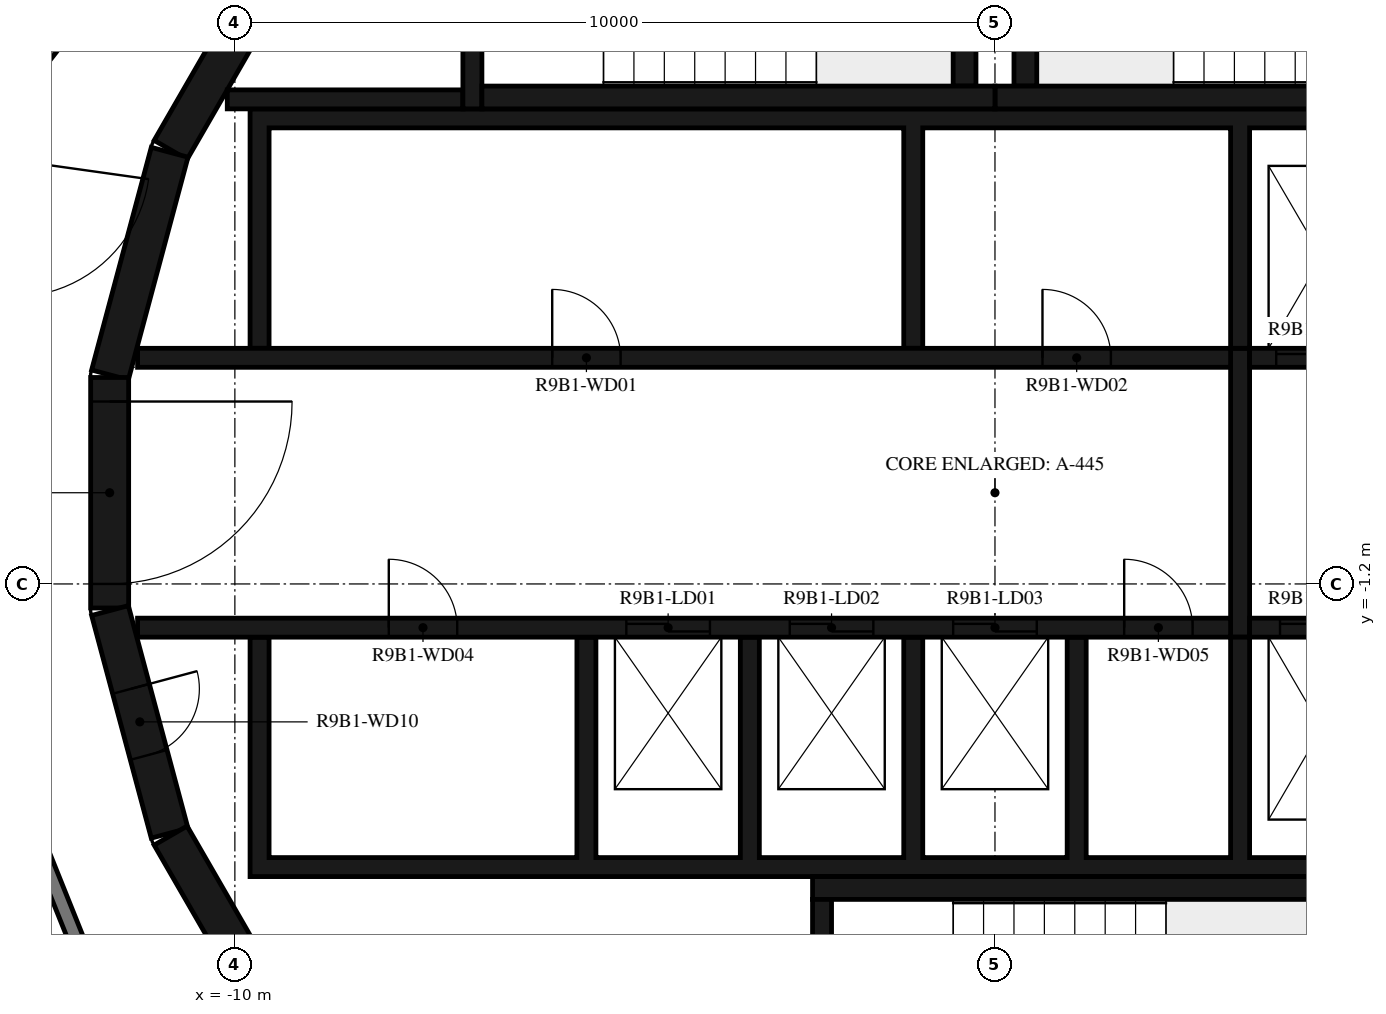
"""IFC4 building model, lengths in metres.
Left out: names, types, materials, properties, quantities, classifications, styles, units other than length and angle.
Written with IfcOpenShell. Run it as: python <this file> out.ifc"""

import sys

from ifc_helpers import new_model, si_unit, direction, frame, frame_2d, origin, place, context, subcontext, project, spatial, polyline, rectangle, outline, extrude, element, fill, save


model = new_model("IFC4")
c1 = context("Model", 3, precision=1e-05, world=origin(), true_north=direction((0.0, 1.0)))
c2 = subcontext(c1, "Body", "Model", "MODEL_VIEW")
j1 = project(units=[si_unit("LENGTHUNIT", "METRE"), si_unit("PLANEANGLEUNIT", "RADIAN")], contexts=[c1])
p1 = place(None, origin())
s1 = spatial("IfcSite", under=j1, at=p1, CompositionType="ELEMENT")
p2 = place(p1, origin())
s2 = spatial("IfcBuilding", under=s1, at=p2, CompositionType="ELEMENT")
p3 = place(p2, frame((0.0, 0.0, 343.5)))
s3 = spatial("IfcBuildingStorey", under=s2, at=p3, CompositionType="ELEMENT", Elevation=343.5)
for number, where, z_axis, x_axis in (
    (1, (-9.329, 7.137, 0.0), (0.0, 0.0, 1.0), (-0.5, -0.866, 0.0)),
    (2, (-10.858, 4.479, 0.0), (0.0, 0.0, 1.0), (-0.259, -0.966, 0.0)),
):
    element("IfcWall", number, at=place(p3, frame(where, z_axis=z_axis, x_axis=x_axis)), inside=s3, PredefinedType="SHEAR", context=c2, shape_type="SweptSolid", body=[
        extrude(rectangle(XDim=3.033, YDim=0.5, at=frame_2d((1.516, 0.0))), origin(), (0.0, 0.0, 1.0), 3.12),
    ])
p4 = place(p3, frame((-11.647, 1.516, 0.0), z_axis=(0.0, 0.0, 1.0), x_axis=(0.0, -1.0, 0.0)))
e3 = element("IfcWall", 3, at=p4, inside=s3, PredefinedType="SHEAR", context=c2, shape_type="SweptSolid", body=[
    extrude(rectangle(XDim=3.033, YDim=0.5, at=frame_2d((1.516, 0.0))), origin(), (0.0, 0.0, 1.0), 3.12),
])
p5 = place(p4, frame((0.316, 0.0, 0.0)))
e4 = element("IfcOpeningElement", 4, at=p5, cuts=e3, PredefinedType="OPENING", context=c2, shape_type="SweptSolid", body=[
    extrude(rectangle(XDim=2.4, YDim=2.1, at=frame_2d((1.2, 1.05))), frame((0.0, 0.26, 0.0), z_axis=(0.0, -1.0, 0.0), x_axis=(1.0, 0.0, 0.0)), (0.0, 0.0, 1.0), 0.52),
])
p6 = place(p3, frame((-11.643, -1.55, 0.0), z_axis=(0.0, 0.0, 1.0), x_axis=(0.258734743916, -0.965948410781, 0.0)))
e5 = element("IfcWall", 5, at=p6, inside=s3, PredefinedType="SHEAR", context=c2, shape_type="SweptSolid", body=[
    extrude(rectangle(XDim=3.033, YDim=0.5, at=frame_2d((1.516, 0.0))), origin(), (0.0, 0.0, 1.0), 3.12),
])
p7 = place(p6, frame((1.066, 0.0, 0.0)))
e6 = element("IfcOpeningElement", 6, at=p7, cuts=e5, PredefinedType="OPENING", context=c2, shape_type="SweptSolid", body=[
    extrude(rectangle(XDim=0.9, YDim=2.1, at=frame_2d((0.45, 1.05))), frame((0.0, 0.26, 0.0), z_axis=(0.0, -1.0, 0.0), x_axis=(1.0, 0.0, 0.0)), (0.0, 0.0, 1.0), 0.52),
])
p8 = place(p3, frame((-10.845, -4.51, 0.0), z_axis=(0.0, 0.0, 1.0), x_axis=(0.500087131594, -0.865975092491, 0.0)))
e7 = element("IfcWall", 7, at=p8, inside=s3, PredefinedType="SHEAR", context=c2, shape_type="SweptSolid", body=[
    extrude(rectangle(XDim=3.033, YDim=0.5, at=frame_2d((1.516, 0.0))), origin(), (0.0, 0.0, 1.0), 3.12),
])
p9 = place(p3, frame((0.0, 5.2, 0.0), z_axis=(0.0, 0.0, 1.0), x_axis=(1.0, 0.0, 0.0)))
e8 = element("IfcWall", 8, at=p9, inside=s3, PredefinedType="SHEAR", context=c2, shape_type="SweptSolid", body=[
    extrude(rectangle(XDim=6.75, YDim=0.3, at=frame_2d((3.375, 0.0))), origin(), (0.0, 0.0, 1.0), 3.12),
])
p10 = place(p3, frame((0.4, 5.35, 0.0), z_axis=(0.0, 0.0, 1.0), x_axis=(0.0, 1.0, 0.0)))
e9 = element("IfcWall", 9, at=p10, inside=s3, PredefinedType="SHEAR", context=c2, shape_type="SweptSolid", body=[
    extrude(rectangle(XDim=3.32, YDim=0.3, at=frame_2d((1.66, 0.0))), origin(), (0.0, 0.0, 1.0), 3.12),
])
p11 = place(p3, frame((-6.75, 5.2, 0.0), z_axis=(0.0, 0.0, 1.0), x_axis=(1.0, 0.0, 0.0)))
e10 = element("IfcWall", 10, at=p11, inside=s3, PredefinedType="SHEAR", context=c2, shape_type="SweptSolid", body=[
    extrude(rectangle(XDim=6.75, YDim=0.3, at=frame_2d((3.375, 0.0))), origin(), (0.0, 0.0, 1.0), 3.12),
])
p12 = place(p3, frame((-0.4, 5.35, 0.0), z_axis=(0.0, 0.0, 1.0), x_axis=(0.0, 1.0, 0.0)))
e11 = element("IfcWall", 11, at=p12, inside=s3, PredefinedType="SHEAR", context=c2, shape_type="SweptSolid", body=[
    extrude(rectangle(XDim=3.32, YDim=0.3, at=frame_2d((1.66, 0.0))), origin(), (0.0, 0.0, 1.0), 3.12),
])
p13 = place(p3, frame((-6.875, 8.97, 0.0), z_axis=(0.0, 0.0, 1.0), x_axis=(0.0, -1.0, 0.0)))
e12 = element("IfcWall", 12, at=p13, inside=s3, PredefinedType="SHEAR", context=c2, shape_type="SweptSolid", body=[
    extrude(rectangle(XDim=3.92, YDim=0.25, at=frame_2d((1.96, 0.0))), origin(), (0.0, 0.0, 1.0), 3.12),
])
p14 = place(p13, frame((1.61, 0.0, 0.0)))
e13 = element("IfcOpeningElement", 13, at=p14, cuts=e12, PredefinedType="OPENING", context=c2, shape_type="SweptSolid", body=[
    extrude(rectangle(XDim=1.2, YDim=2.1, at=frame_2d((0.6, 1.05))), frame((0.0, 0.135, 0.0), z_axis=(0.0, -1.0, 0.0), x_axis=(1.0, 0.0, 0.0)), (0.0, 0.0, 1.0), 0.27),
])
p15 = place(p3, frame((-7.0, 5.175, 0.0), z_axis=(0.0, 0.0, 1.0), x_axis=(-1.0, 0.0, 0.0)))
e14 = element("IfcWall", 14, at=p15, inside=s3, PredefinedType="SHEAR", context=c2, shape_type="SweptSolid", body=[
    extrude(rectangle(XDim=3.1, YDim=0.25, at=frame_2d((1.55, 0.0))), origin(), (0.0, 0.0, 1.0), 3.12),
])
p16 = place(p3, frame((-2.275, -8.67, 0.0), z_axis=(0.0, 0.0, 1.0), x_axis=(0.0, 1.0, 0.0)))
e15 = element("IfcWall", 15, at=p16, inside=s3, PredefinedType="SHEAR", context=c2, shape_type="SweptSolid", body=[
    extrude(rectangle(XDim=3.32, YDim=0.25, at=frame_2d((1.66, 0.0))), origin(), (0.0, 0.0, 1.0), 3.12),
])
p17 = place(p3, frame((-2.4, -5.2, 0.0), z_axis=(0.0, 0.0, 1.0), x_axis=(1.0, 0.0, 0.0)))
e16 = element("IfcWall", 16, at=p17, inside=s3, PredefinedType="SHEAR", context=c2, shape_type="SweptSolid", body=[
    extrude(rectangle(XDim=7.05, YDim=0.3, at=frame_2d((3.525, 0.0))), origin(), (0.0, 0.0, 1.0), 3.12),
])
p18 = place(p3, origin())
e17 = element("IfcWall", 17, at=p18, inside=s3, PredefinedType="SHEAR", context=c2, shape_type="SweptSolid", body=[
    extrude(outline(polyline([(-9.8, 1.9), (-9.55, 1.9), (-9.55, 4.8), (-1.2, 4.8), (-1.2, 1.9), (-0.95, 1.9), (-0.95, 4.8), (3.1, 4.8), (3.1, 1.9), (3.35, 1.9), (3.35, 4.8), (5.25, 4.8), (5.25, 1.9), (5.5, 1.9), (5.5, 4.8), (7.4, 4.8), (7.4, 1.9), (7.65, 1.9), (7.65, 4.8), (9.55, 4.8), (9.55, 1.9), (9.8, 1.9), (9.8, 4.8), (9.8, 5.05), (-9.8, 5.05), (-9.8, 4.8), (-9.8, 1.9)])), origin(), (0.0, 0.0, 1.0), 3.12),
])
p19 = place(p3, origin())
e18 = element("IfcWall", 18, at=p19, inside=s3, PredefinedType="SHEAR", context=c2, shape_type="SweptSolid", body=[
    extrude(outline(polyline([(9.8, -5.05), (9.8, -4.8), (9.8, -1.9), (9.55, -1.9), (9.55, -4.8), (7.65, -4.8), (7.65, -1.9), (7.4, -1.9), (7.4, -4.8), (5.5, -4.8), (5.5, -1.9), (5.25, -1.9), (5.25, -4.8), (3.35, -4.8), (3.35, -1.9), (3.1, -1.9), (3.1, -4.8), (1.2, -4.8), (1.2, -1.9), (0.95, -1.9), (0.95, -4.8), (-0.95, -4.8), (-0.95, -1.9), (-1.2, -1.9), (-1.2, -4.8), (-3.1, -4.8), (-3.1, -1.9), (-3.35, -1.9), (-3.35, -4.8), (-5.25, -4.8), (-5.25, -1.9), (-5.5, -1.9), (-5.5, -4.8), (-9.55, -4.8), (-9.55, -1.9), (-9.8, -1.9), (-9.8, -4.8), (-9.8, -5.05), (9.8, -5.05)])), origin(), (0.0, 0.0, 1.0), 3.12),
])
p20 = place(p3, frame((-11.28, 1.775, 0.0), z_axis=(0.0, 0.0, 1.0), x_axis=(1.0, 0.0, 0.0)))
e19 = element("IfcWall", 19, at=p20, inside=s3, PredefinedType="SHEAR", context=c2, shape_type="SweptSolid", body=[
    extrude(rectangle(XDim=14.38, YDim=0.25, at=frame_2d((7.19, 0.0))), origin(), (0.0, 0.0, 1.0), 3.12),
])
p21 = place(p20, frame((5.455, 0.0, 0.0)))
e20 = element("IfcOpeningElement", 20, at=p21, cuts=e19, PredefinedType="OPENING", context=c2, shape_type="SweptSolid", body=[
    extrude(rectangle(XDim=0.9, YDim=2.1, at=frame_2d((0.45, 1.05))), frame((0.0, 0.135, 0.0), z_axis=(0.0, -1.0, 0.0), x_axis=(1.0, 0.0, 0.0)), (0.0, 0.0, 1.0), 0.27),
])
p22 = place(p20, frame((11.905, 0.0, 0.0)))
e21 = element("IfcOpeningElement", 21, at=p22, cuts=e19, PredefinedType="OPENING", context=c2, shape_type="SweptSolid", body=[
    extrude(rectangle(XDim=0.9, YDim=2.1, at=frame_2d((0.45, 1.05))), frame((0.0, 0.135, 0.0), z_axis=(0.0, -1.0, 0.0), x_axis=(1.0, 0.0, 0.0)), (0.0, 0.0, 1.0), 0.27),
])
p23 = place(p3, frame((3.35, 1.775, 0.0), z_axis=(0.0, 0.0, 1.0), x_axis=(1.0, 0.0, 0.0)))
e22 = element("IfcWall", 22, at=p23, inside=s3, PredefinedType="SHEAR", context=c2, shape_type="SweptSolid", body=[
    extrude(rectangle(XDim=7.93, YDim=0.25, at=frame_2d((3.965, 0.0))), origin(), (0.0, 0.0, 1.0), 3.12),
])
p24 = place(p23, frame((0.35, 0.0, 0.0)))
e23 = element("IfcOpeningElement", 23, at=p24, cuts=e22, PredefinedType="OPENING", context=c2, shape_type="SweptSolid", body=[
    extrude(rectangle(XDim=1.2, YDim=2.4, at=frame_2d((0.6, 1.2))), frame((0.0, 0.135, 0.0), z_axis=(0.0, -1.0, 0.0), x_axis=(1.0, 0.0, 0.0)), (0.0, 0.0, 1.0), 0.27),
])
p25 = place(p23, frame((2.5, 0.0, 0.0)))
e24 = element("IfcOpeningElement", 24, at=p25, cuts=e22, PredefinedType="OPENING", context=c2, shape_type="SweptSolid", body=[
    extrude(rectangle(XDim=1.2, YDim=2.4, at=frame_2d((0.6, 1.2))), frame((0.0, 0.135, 0.0), z_axis=(0.0, -1.0, 0.0), x_axis=(1.0, 0.0, 0.0)), (0.0, 0.0, 1.0), 0.27),
])
p26 = place(p23, frame((4.8, 0.0, 0.0)))
e25 = element("IfcOpeningElement", 25, at=p26, cuts=e22, PredefinedType="OPENING", context=c2, shape_type="SweptSolid", body=[
    extrude(rectangle(XDim=0.9, YDim=2.1, at=frame_2d((0.45, 1.05))), frame((0.0, 0.135, 0.0), z_axis=(0.0, -1.0, 0.0), x_axis=(1.0, 0.0, 0.0)), (0.0, 0.0, 1.0), 0.27),
])
p27 = place(p3, frame((-11.28, -1.775, 0.0), z_axis=(0.0, 0.0, 1.0), x_axis=(1.0, 0.0, 0.0)))
e26 = element("IfcWall", 26, at=p27, inside=s3, PredefinedType="SHEAR", context=c2, shape_type="SweptSolid", body=[
    extrude(rectangle(XDim=14.38, YDim=0.25, at=frame_2d((7.19, 0.0))), origin(), (0.0, 0.0, 1.0), 3.12),
])
p28 = place(p27, frame((6.43, 0.0, 0.0)))
e27 = element("IfcOpeningElement", 27, at=p28, cuts=e26, PredefinedType="OPENING", context=c2, shape_type="SweptSolid", body=[
    extrude(rectangle(XDim=1.1, YDim=2.1, at=frame_2d((0.55, 1.05))), frame((0.0, 0.135, 0.0), z_axis=(0.0, -1.0, 0.0), x_axis=(1.0, 0.0, 0.0)), (0.0, 0.0, 1.0), 0.27),
])
p29 = place(p27, frame((8.58, 0.0, 0.0)))
e28 = element("IfcOpeningElement", 28, at=p29, cuts=e26, PredefinedType="OPENING", context=c2, shape_type="SweptSolid", body=[
    extrude(rectangle(XDim=1.1, YDim=2.1, at=frame_2d((0.55, 1.05))), frame((0.0, 0.135, 0.0), z_axis=(0.0, -1.0, 0.0), x_axis=(1.0, 0.0, 0.0)), (0.0, 0.0, 1.0), 0.27),
])
p30 = place(p27, frame((10.73, 0.0, 0.0)))
e29 = element("IfcOpeningElement", 29, at=p30, cuts=e26, PredefinedType="OPENING", context=c2, shape_type="SweptSolid", body=[
    extrude(rectangle(XDim=1.1, YDim=2.1, at=frame_2d((0.55, 1.05))), frame((0.0, 0.135, 0.0), z_axis=(0.0, -1.0, 0.0), x_axis=(1.0, 0.0, 0.0)), (0.0, 0.0, 1.0), 0.27),
])
p31 = place(p27, frame((3.305, 0.0, 0.0)))
e30 = element("IfcOpeningElement", 30, at=p31, cuts=e26, PredefinedType="OPENING", context=c2, shape_type="SweptSolid", body=[
    extrude(rectangle(XDim=0.9, YDim=2.1, at=frame_2d((0.45, 1.05))), frame((0.0, 0.135, 0.0), z_axis=(0.0, -1.0, 0.0), x_axis=(1.0, 0.0, 0.0)), (0.0, 0.0, 1.0), 0.27),
])
p32 = place(p27, frame((12.98, 0.0, 0.0)))
e31 = element("IfcOpeningElement", 31, at=p32, cuts=e26, PredefinedType="OPENING", context=c2, shape_type="SweptSolid", body=[
    extrude(rectangle(XDim=0.9, YDim=2.1, at=frame_2d((0.45, 1.05))), frame((0.0, 0.135, 0.0), z_axis=(0.0, -1.0, 0.0), x_axis=(1.0, 0.0, 0.0)), (0.0, 0.0, 1.0), 0.27),
])
p33 = place(p3, frame((3.35, -1.775, 0.0), z_axis=(0.0, 0.0, 1.0), x_axis=(1.0, 0.0, 0.0)))
e32 = element("IfcWall", 32, at=p33, inside=s3, PredefinedType="SHEAR", context=c2, shape_type="SweptSolid", body=[
    extrude(rectangle(XDim=7.93, YDim=0.25, at=frame_2d((3.965, 0.0))), origin(), (0.0, 0.0, 1.0), 3.12),
])
p34 = place(p33, frame((0.4, 0.0, 0.0)))
e33 = element("IfcOpeningElement", 33, at=p34, cuts=e32, PredefinedType="OPENING", context=c2, shape_type="SweptSolid", body=[
    extrude(rectangle(XDim=1.1, YDim=2.4, at=frame_2d((0.55, 1.2))), frame((0.0, 0.135, 0.0), z_axis=(0.0, -1.0, 0.0), x_axis=(1.0, 0.0, 0.0)), (0.0, 0.0, 1.0), 0.27),
])
p35 = place(p33, frame((2.55, 0.0, 0.0)))
e34 = element("IfcOpeningElement", 34, at=p35, cuts=e32, PredefinedType="OPENING", context=c2, shape_type="SweptSolid", body=[
    extrude(rectangle(XDim=1.1, YDim=2.4, at=frame_2d((0.55, 1.2))), frame((0.0, 0.135, 0.0), z_axis=(0.0, -1.0, 0.0), x_axis=(1.0, 0.0, 0.0)), (0.0, 0.0, 1.0), 0.27),
])
p36 = place(p33, frame((4.7, 0.0, 0.0)))
e35 = element("IfcOpeningElement", 35, at=p36, cuts=e32, PredefinedType="OPENING", context=c2, shape_type="SweptSolid", body=[
    extrude(rectangle(XDim=1.1, YDim=2.4, at=frame_2d((0.55, 1.2))), frame((0.0, 0.135, 0.0), z_axis=(0.0, -1.0, 0.0), x_axis=(1.0, 0.0, 0.0)), (0.0, 0.0, 1.0), 0.27),
])
p37 = place(p3, frame((3.225, -1.9, 0.0), z_axis=(0.0, 0.0, 1.0), x_axis=(0.0, 1.0, 0.0)))
e36 = element("IfcWall", 36, at=p37, inside=s3, PredefinedType="SHEAR", context=c2, shape_type="SweptSolid", body=[
    extrude(rectangle(XDim=3.8, YDim=0.25, at=frame_2d((1.9, 0.0))), origin(), (0.0, 0.0, 1.0), 3.12),
])
p38 = place(p3, frame((-13.769, -1.691, 0.0), z_axis=(0.0, 0.0, 1.0), x_axis=(0.372720094028, -0.927943819155, 0.0)))
e37 = element("IfcWall", 37, at=p38, inside=s3, PredefinedType="STANDARD", context=c2, shape_type="SweptSolid", body=[
    extrude(rectangle(XDim=4.875, YDim=0.2, at=frame_2d((2.438, 0.0))), origin(), (0.0, 0.0, 1.0), 3.12),
])
p39 = place(p3, frame((-8.349, 11.079, 0.0), z_axis=(0.0, 0.0, 1.0), x_axis=(-0.615669112324, -0.78800478687, 0.0)))
e38 = element("IfcWall", 38, at=p39, inside=s3, PredefinedType="STANDARD", context=c2, shape_type="SweptSolid", body=[
    extrude(rectangle(XDim=7.181, YDim=0.2, at=frame_2d((3.591, 0.0))), origin(), (0.0, 0.0, 1.0), 3.12),
])
p40 = place(p39, frame((2.1, 0.0, 0.0)))
e39 = element("IfcOpeningElement", 39, at=p40, cuts=e38, PredefinedType="OPENING", context=c2, shape_type="SweptSolid", body=[
    extrude(rectangle(XDim=1.0, YDim=2.1, at=frame_2d((0.5, 1.05))), frame((0.0, 0.11, 0.0), z_axis=(0.0, -1.0, 0.0), x_axis=(1.0, 0.0, 0.0)), (0.0, 0.0, 1.0), 0.22),
])
p41 = place(p39, frame((3.79, 0.0, 0.0)))
e40 = element("IfcOpeningElement", 40, at=p41, cuts=e38, PredefinedType="OPENING", context=c2, shape_type="SweptSolid", body=[
    extrude(rectangle(XDim=1.0, YDim=2.1, at=frame_2d((0.5, 1.05))), frame((0.0, 0.11, 0.0), z_axis=(0.0, -1.0, 0.0), x_axis=(1.0, 0.0, 0.0)), (0.0, 0.0, 1.0), 0.22),
])
p42 = place(p5, origin())
e41 = element("IfcDoor", 41, at=p42, inside=s3, OperationType="DOUBLE_DOOR_SINGLE_SWING", PredefinedType="DOOR", context=c2, shape_type="SweptSolid", body=[
    extrude(rectangle(XDim=2.4, YDim=2.1, at=frame_2d((1.2, 1.05))), frame((0.0, 0.025, 0.0), z_axis=(0.0, -1.0, 0.0), x_axis=(1.0, 0.0, 0.0)), (0.0, 0.0, 1.0), 0.05),
])
fill(e4, e41)
p43 = place(p24, origin())
e42 = element("IfcDoor", 42, at=p43, inside=s3, OperationType="DOUBLE_DOOR_SLIDING", PredefinedType="DOOR", context=c2, shape_type="SweptSolid", body=[
    extrude(rectangle(XDim=1.2, YDim=2.4, at=frame_2d((0.6, 1.2))), frame((0.0, 0.025, 0.0), z_axis=(0.0, -1.0, 0.0), x_axis=(1.0, 0.0, 0.0)), (0.0, 0.0, 1.0), 0.05),
])
fill(e23, e42)
p44 = place(p28, origin())
e43 = element("IfcDoor", 43, at=p44, inside=s3, OperationType="DOUBLE_DOOR_SLIDING", PredefinedType="DOOR", context=c2, shape_type="SweptSolid", body=[
    extrude(rectangle(XDim=1.1, YDim=2.1, at=frame_2d((0.55, 1.05))), frame((0.0, 0.025, 0.0), z_axis=(0.0, -1.0, 0.0), x_axis=(1.0, 0.0, 0.0)), (0.0, 0.0, 1.0), 0.05),
])
fill(e27, e43)
p45 = place(p29, origin())
e44 = element("IfcDoor", 44, at=p45, inside=s3, OperationType="DOUBLE_DOOR_SLIDING", PredefinedType="DOOR", context=c2, shape_type="SweptSolid", body=[
    extrude(rectangle(XDim=1.1, YDim=2.1, at=frame_2d((0.55, 1.05))), frame((0.0, 0.025, 0.0), z_axis=(0.0, -1.0, 0.0), x_axis=(1.0, 0.0, 0.0)), (0.0, 0.0, 1.0), 0.05),
])
fill(e28, e44)
p46 = place(p30, origin())
e45 = element("IfcDoor", 45, at=p46, inside=s3, OperationType="DOUBLE_DOOR_SLIDING", PredefinedType="DOOR", context=c2, shape_type="SweptSolid", body=[
    extrude(rectangle(XDim=1.1, YDim=2.1, at=frame_2d((0.55, 1.05))), frame((0.0, 0.025, 0.0), z_axis=(0.0, -1.0, 0.0), x_axis=(1.0, 0.0, 0.0)), (0.0, 0.0, 1.0), 0.05),
])
fill(e29, e45)
p47 = place(p34, origin())
e46 = element("IfcDoor", 46, at=p47, inside=s3, OperationType="DOUBLE_DOOR_SLIDING", PredefinedType="DOOR", context=c2, shape_type="SweptSolid", body=[
    extrude(rectangle(XDim=1.1, YDim=2.4, at=frame_2d((0.55, 1.2))), frame((0.0, 0.025, 0.0), z_axis=(0.0, -1.0, 0.0), x_axis=(1.0, 0.0, 0.0)), (0.0, 0.0, 1.0), 0.05),
])
fill(e33, e46)
p48 = place(p21, origin())
e47 = element("IfcDoor", 47, at=p48, inside=s3, OperationType="SINGLE_SWING_LEFT", PredefinedType="DOOR", context=c2, shape_type="SweptSolid", body=[
    extrude(rectangle(XDim=0.9, YDim=2.1, at=frame_2d((0.45, 1.05))), frame((0.0, 0.025, 0.0), z_axis=(0.0, -1.0, 0.0), x_axis=(1.0, 0.0, 0.0)), (0.0, 0.0, 1.0), 0.05),
])
fill(e20, e47)
p49 = place(p22, origin())
e48 = element("IfcDoor", 48, at=p49, inside=s3, OperationType="SINGLE_SWING_RIGHT", PredefinedType="DOOR", context=c2, shape_type="SweptSolid", body=[
    extrude(rectangle(XDim=0.9, YDim=2.1, at=frame_2d((0.45, 1.05))), frame((0.0, 0.025, 0.0), z_axis=(0.0, -1.0, 0.0), x_axis=(1.0, 0.0, 0.0)), (0.0, 0.0, 1.0), 0.05),
])
fill(e21, e48)
p50 = place(p31, origin())
e49 = element("IfcDoor", 49, at=p50, inside=s3, OperationType="SINGLE_SWING_RIGHT", PredefinedType="DOOR", context=c2, shape_type="SweptSolid", body=[
    extrude(rectangle(XDim=0.9, YDim=2.1, at=frame_2d((0.45, 1.05))), frame((0.0, 0.025, 0.0), z_axis=(0.0, -1.0, 0.0), x_axis=(1.0, 0.0, 0.0)), (0.0, 0.0, 1.0), 0.05),
])
fill(e30, e49)
p51 = place(p32, origin())
e50 = element("IfcDoor", 50, at=p51, inside=s3, OperationType="SINGLE_SWING_LEFT", PredefinedType="DOOR", context=c2, shape_type="SweptSolid", body=[
    extrude(rectangle(XDim=0.9, YDim=2.1, at=frame_2d((0.45, 1.05))), frame((0.0, 0.025, 0.0), z_axis=(0.0, -1.0, 0.0), x_axis=(1.0, 0.0, 0.0)), (0.0, 0.0, 1.0), 0.05),
])
fill(e31, e50)
p52 = place(p7, origin())
e51 = element("IfcDoor", 51, at=p52, inside=s3, OperationType="SINGLE_SWING_RIGHT", PredefinedType="DOOR", context=c2, shape_type="SweptSolid", body=[
    extrude(rectangle(XDim=0.9, YDim=2.1, at=frame_2d((0.45, 1.05))), frame((0.0, 0.025, 0.0), z_axis=(0.0, -1.0, 0.0), x_axis=(1.0, 0.0, 0.0)), (0.0, 0.0, 1.0), 0.05),
])
fill(e6, e51)
save(model, sys.argv[1])
